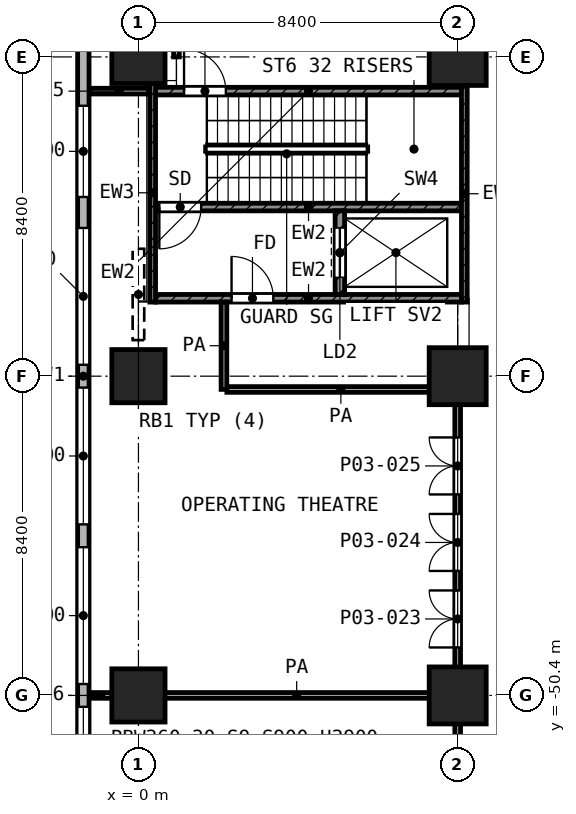
"""IFC4 building model, lengths in metres.
Left out: names, types, materials, properties, quantities, classifications, styles, units other than length and angle.
Written with IfcOpenShell. Run it as: python <this file> out.ifc"""

import sys

from ifc_helpers import new_model, si_unit, direction, frame, frame_2d, origin, origin_2d, place, context, subcontext, project, spatial, rectangle, extrude, element, fill, save


model = new_model("IFC4")
c1 = context("Model", 3, precision=1e-05, world=origin(), true_north=direction((0.0, 1.0)))
c2 = subcontext(c1, "Body", "Model", "MODEL_VIEW")
j1 = project(units=[si_unit("LENGTHUNIT", "METRE"), si_unit("PLANEANGLEUNIT", "RADIAN")], contexts=[c1])
p1 = place(None, origin())
s1 = spatial("IfcSite", under=j1, at=p1, CompositionType="ELEMENT")
p2 = place(p1, origin())
s2 = spatial("IfcBuilding", under=s1, at=p2, CompositionType="ELEMENT")
p3 = place(p2, frame((0.0, 0.0, 12.6)))
s3 = spatial("IfcBuildingStorey", under=s2, at=p3, CompositionType="ELEMENT", Elevation=12.6)
p4 = place(p3, frame((0.0, -33.6, 0.0), z_axis=(0.0, 0.0, 1.0), x_axis=(1.0, 0.0, 0.0)))
e1 = element("IfcColumn", 1, at=p4, inside=s3, PredefinedType="COLUMN", context=c2, shape_type="SweptSolid", body=[
    extrude(rectangle(XDim=1.4, YDim=1.4, at=origin_2d()), origin(), (0.0, 0.0, 1.0), 5.6),
])
p5 = place(p3, frame((8.4, -33.6, 0.0), z_axis=(0.0, 0.0, 1.0), x_axis=(1.0, 0.0, 0.0)))
e2 = element("IfcColumn", 2, at=p5, inside=s3, PredefinedType="COLUMN", context=c2, shape_type="SweptSolid", body=[
    extrude(rectangle(XDim=1.5, YDim=1.5, at=origin_2d()), origin(), (0.0, 0.0, 1.0), 5.6),
])
p6 = place(p3, frame((0.0, -42.0, 0.0), z_axis=(0.0, 0.0, 1.0), x_axis=(1.0, 0.0, 0.0)))
e3 = element("IfcColumn", 3, at=p6, inside=s3, PredefinedType="COLUMN", context=c2, shape_type="SweptSolid", body=[
    extrude(rectangle(XDim=1.4, YDim=1.4, at=origin_2d()), origin(), (0.0, 0.0, 1.0), 5.6),
])
p7 = place(p3, frame((8.4, -42.0, 0.0), z_axis=(0.0, 0.0, 1.0), x_axis=(1.0, 0.0, 0.0)))
e4 = element("IfcColumn", 4, at=p7, inside=s3, PredefinedType="COLUMN", context=c2, shape_type="SweptSolid", body=[
    extrude(rectangle(XDim=1.5, YDim=1.5, at=origin_2d()), origin(), (0.0, 0.0, 1.0), 5.6),
])
p8 = place(p3, frame((0.0, -50.4, 0.0), z_axis=(0.0, 0.0, 1.0), x_axis=(1.0, 0.0, 0.0)))
e5 = element("IfcColumn", 5, at=p8, inside=s3, PredefinedType="COLUMN", context=c2, shape_type="SweptSolid", body=[
    extrude(rectangle(XDim=1.4, YDim=1.4, at=origin_2d()), origin(), (0.0, 0.0, 1.0), 5.6),
])
p9 = place(p3, frame((8.4, -50.4, 0.0), z_axis=(0.0, 0.0, 1.0), x_axis=(1.0, 0.0, 0.0)))
e6 = element("IfcColumn", 6, at=p9, inside=s3, PredefinedType="COLUMN", context=c2, shape_type="SweptSolid", body=[
    extrude(rectangle(XDim=1.5, YDim=1.5, at=origin_2d()), origin(), (0.0, 0.0, 1.0), 5.6),
])
p10 = place(p3, frame((-1.45, -4.462, 0.0), z_axis=(0.0, 0.0, 1.0), x_axis=(0.0, -1.0, 0.0)))
e7 = element("IfcWall", 7, at=p10, inside=s3, PredefinedType="SOLIDWALL", context=c2, shape_type="SweptSolid", body=[
    extrude(rectangle(XDim=75.076, YDim=0.3, at=frame_2d((37.538, 0.0))), origin(), (0.0, 0.0, 1.0), 5.25),
])
p11 = place(p10, frame((0.738, 0.0, 0.9)))
e8 = element("IfcOpeningElement", 8, at=p11, cuts=e7, PredefinedType="OPENING", context=c2, shape_type="SweptSolid", body=[
    extrude(rectangle(XDim=2.4, YDim=3.0, at=frame_2d((1.2, 1.5))), frame((0.0, 0.16, 0.0), z_axis=(0.0, -1.0, 0.0), x_axis=(1.0, 0.0, 0.0)), (0.0, 0.0, 1.0), 0.32),
])
p12 = place(p10, frame((4.238, 0.0, 0.9)))
e9 = element("IfcOpeningElement", 9, at=p12, cuts=e7, PredefinedType="OPENING", context=c2, shape_type="SweptSolid", body=[
    extrude(rectangle(XDim=3.6, YDim=3.0, at=frame_2d((1.8, 1.5))), frame((0.0, 0.16, 0.0), z_axis=(0.0, -1.0, 0.0), x_axis=(1.0, 0.0, 0.0)), (0.0, 0.0, 1.0), 0.32),
])
p13 = place(p10, frame((8.438, 0.0, 0.9)))
e10 = element("IfcOpeningElement", 10, at=p13, cuts=e7, PredefinedType="OPENING", context=c2, shape_type="SweptSolid", body=[
    extrude(rectangle(XDim=3.6, YDim=3.0, at=frame_2d((1.8, 1.5))), frame((0.0, 0.16, 0.0), z_axis=(0.0, -1.0, 0.0), x_axis=(1.0, 0.0, 0.0)), (0.0, 0.0, 1.0), 0.32),
])
p14 = place(p10, frame((12.638, 0.0, 0.9)))
e11 = element("IfcOpeningElement", 11, at=p14, cuts=e7, PredefinedType="OPENING", context=c2, shape_type="SweptSolid", body=[
    extrude(rectangle(XDim=3.6, YDim=3.0, at=frame_2d((1.8, 1.5))), frame((0.0, 0.16, 0.0), z_axis=(0.0, -1.0, 0.0), x_axis=(1.0, 0.0, 0.0)), (0.0, 0.0, 1.0), 0.32),
])
p15 = place(p10, frame((16.838, 0.0, 0.9)))
e12 = element("IfcOpeningElement", 12, at=p15, cuts=e7, PredefinedType="OPENING", context=c2, shape_type="SweptSolid", body=[
    extrude(rectangle(XDim=3.6, YDim=3.0, at=frame_2d((1.8, 1.5))), frame((0.0, 0.16, 0.0), z_axis=(0.0, -1.0, 0.0), x_axis=(1.0, 0.0, 0.0)), (0.0, 0.0, 1.0), 0.32),
])
p16 = place(p10, frame((21.403, 0.0, 0.9)))
e13 = element("IfcOpeningElement", 13, at=p16, cuts=e7, PredefinedType="OPENING", context=c2, shape_type="SweptSolid", body=[
    extrude(rectangle(XDim=2.4, YDim=3.0, at=frame_2d((1.2, 1.5))), frame((0.0, 0.16, 0.0), z_axis=(0.0, -1.0, 0.0), x_axis=(1.0, 0.0, 0.0)), (0.0, 0.0, 1.0), 0.32),
])
p17 = place(p10, frame((25.238, 0.0, 0.9)))
e14 = element("IfcOpeningElement", 14, at=p17, cuts=e7, PredefinedType="OPENING", context=c2, shape_type="SweptSolid", body=[
    extrude(rectangle(XDim=3.6, YDim=3.0, at=frame_2d((1.8, 1.5))), frame((0.0, 0.16, 0.0), z_axis=(0.0, -1.0, 0.0), x_axis=(1.0, 0.0, 0.0)), (0.0, 0.0, 1.0), 0.32),
])
p18 = place(p10, frame((30.423, 0.0, 0.9)))
e15 = element("IfcOpeningElement", 15, at=p18, cuts=e7, PredefinedType="OPENING", context=c2, shape_type="SweptSolid", body=[
    extrude(rectangle(XDim=2.4, YDim=3.0, at=frame_2d((1.2, 1.5))), frame((0.0, 0.16, 0.0), z_axis=(0.0, -1.0, 0.0), x_axis=(1.0, 0.0, 0.0)), (0.0, 0.0, 1.0), 0.32),
])
p19 = place(p10, frame((33.638, 0.0, 0.9)))
e16 = element("IfcOpeningElement", 16, at=p19, cuts=e7, PredefinedType="OPENING", context=c2, shape_type="SweptSolid", body=[
    extrude(rectangle(XDim=3.6, YDim=3.0, at=frame_2d((1.8, 1.5))), frame((0.0, 0.16, 0.0), z_axis=(0.0, -1.0, 0.0), x_axis=(1.0, 0.0, 0.0)), (0.0, 0.0, 1.0), 0.32),
])
p20 = place(p10, frame((37.838, 0.0, 0.9)))
e17 = element("IfcOpeningElement", 17, at=p20, cuts=e7, PredefinedType="OPENING", context=c2, shape_type="SweptSolid", body=[
    extrude(rectangle(XDim=3.6, YDim=3.0, at=frame_2d((1.8, 1.5))), frame((0.0, 0.16, 0.0), z_axis=(0.0, -1.0, 0.0), x_axis=(1.0, 0.0, 0.0)), (0.0, 0.0, 1.0), 0.32),
])
p21 = place(p10, frame((42.038, 0.0, 0.9)))
e18 = element("IfcOpeningElement", 18, at=p21, cuts=e7, PredefinedType="OPENING", context=c2, shape_type="SweptSolid", body=[
    extrude(rectangle(XDim=3.6, YDim=3.0, at=frame_2d((1.8, 1.5))), frame((0.0, 0.16, 0.0), z_axis=(0.0, -1.0, 0.0), x_axis=(1.0, 0.0, 0.0)), (0.0, 0.0, 1.0), 0.32),
])
p22 = place(p10, frame((46.238, 0.0, 0.9)))
e19 = element("IfcOpeningElement", 19, at=p22, cuts=e7, PredefinedType="OPENING", context=c2, shape_type="SweptSolid", body=[
    extrude(rectangle(XDim=3.6, YDim=3.0, at=frame_2d((1.8, 1.5))), frame((0.0, 0.16, 0.0), z_axis=(0.0, -1.0, 0.0), x_axis=(1.0, 0.0, 0.0)), (0.0, 0.0, 1.0), 0.32),
])
p23 = place(p10, frame((50.438, 0.0, 0.9)))
e20 = element("IfcOpeningElement", 20, at=p23, cuts=e7, PredefinedType="OPENING", context=c2, shape_type="SweptSolid", body=[
    extrude(rectangle(XDim=3.6, YDim=3.0, at=frame_2d((1.8, 1.5))), frame((0.0, 0.16, 0.0), z_axis=(0.0, -1.0, 0.0), x_axis=(1.0, 0.0, 0.0)), (0.0, 0.0, 1.0), 0.32),
])
p24 = place(p10, frame((54.638, 0.0, 0.9)))
e21 = element("IfcOpeningElement", 21, at=p24, cuts=e7, PredefinedType="OPENING", context=c2, shape_type="SweptSolid", body=[
    extrude(rectangle(XDim=3.6, YDim=3.0, at=frame_2d((1.8, 1.5))), frame((0.0, 0.16, 0.0), z_axis=(0.0, -1.0, 0.0), x_axis=(1.0, 0.0, 0.0)), (0.0, 0.0, 1.0), 0.32),
])
p25 = place(p10, frame((58.838, 0.0, 0.9)))
e22 = element("IfcOpeningElement", 22, at=p25, cuts=e7, PredefinedType="OPENING", context=c2, shape_type="SweptSolid", body=[
    extrude(rectangle(XDim=3.6, YDim=3.0, at=frame_2d((1.8, 1.5))), frame((0.0, 0.16, 0.0), z_axis=(0.0, -1.0, 0.0), x_axis=(1.0, 0.0, 0.0)), (0.0, 0.0, 1.0), 0.32),
])
p26 = place(p10, frame((63.038, 0.0, 0.9)))
e23 = element("IfcOpeningElement", 23, at=p26, cuts=e7, PredefinedType="OPENING", context=c2, shape_type="SweptSolid", body=[
    extrude(rectangle(XDim=3.6, YDim=3.0, at=frame_2d((1.8, 1.5))), frame((0.0, 0.16, 0.0), z_axis=(0.0, -1.0, 0.0), x_axis=(1.0, 0.0, 0.0)), (0.0, 0.0, 1.0), 0.32),
])
p27 = place(p10, frame((67.603, 0.0, 0.9)))
e24 = element("IfcOpeningElement", 24, at=p27, cuts=e7, PredefinedType="OPENING", context=c2, shape_type="SweptSolid", body=[
    extrude(rectangle(XDim=1.2, YDim=3.0, at=frame_2d((0.6, 1.5))), frame((0.0, 0.16, 0.0), z_axis=(0.0, -1.0, 0.0), x_axis=(1.0, 0.0, 0.0)), (0.0, 0.0, 1.0), 0.32),
])
p28 = place(p10, frame((71.938, 0.0, 0.9)))
e25 = element("IfcOpeningElement", 25, at=p28, cuts=e7, PredefinedType="OPENING", context=c2, shape_type="SweptSolid", body=[
    extrude(rectangle(XDim=2.4, YDim=3.0, at=frame_2d((1.2, 1.5))), frame((0.0, 0.16, 0.0), z_axis=(0.0, -1.0, 0.0), x_axis=(1.0, 0.0, 0.0)), (0.0, 0.0, 1.0), 0.32),
])
p29 = place(p3, frame((0.375, -40.05, 0.0), z_axis=(0.0, 0.0, 1.0), x_axis=(0.0, 1.0, 0.0)))
e26 = element("IfcWall", 26, at=p29, inside=s3, PredefinedType="SHEAR", context=c2, shape_type="SweptSolid", body=[
    extrude(rectangle(XDim=5.75, YDim=0.15, at=frame_2d((2.875, 0.0))), origin(), (0.0, 0.0, 1.0), 5.25),
])
p30 = place(p3, frame((8.575, -40.05, 0.0), z_axis=(0.0, 0.0, 1.0), x_axis=(0.0, 1.0, 0.0)))
e27 = element("IfcWall", 27, at=p30, inside=s3, PredefinedType="SHEAR", context=c2, shape_type="SweptSolid", body=[
    extrude(rectangle(XDim=5.7, YDim=0.15, at=frame_2d((2.85, 0.0))), origin(), (0.0, 0.0, 1.0), 5.25),
])
p31 = place(p3, frame((0.45, -34.5, 0.0), z_axis=(0.0, 0.0, 1.0), x_axis=(1.0, 0.0, 0.0)))
e28 = element("IfcWall", 28, at=p31, inside=s3, PredefinedType="SHEAR", context=c2, shape_type="SweptSolid", body=[
    extrude(rectangle(XDim=8.05, YDim=0.2, at=frame_2d((4.025, 0.0))), origin(), (0.0, 0.0, 1.0), 5.25),
])
p32 = place(p31, frame((0.75, 0.0, 0.0)))
e29 = element("IfcOpeningElement", 29, at=p32, cuts=e28, PredefinedType="OPENING", context=c2, shape_type="SweptSolid", body=[
    extrude(rectangle(XDim=1.1, YDim=2.1, at=frame_2d((0.55, 1.05))), frame((0.0, 0.11, 0.0), z_axis=(0.0, -1.0, 0.0), x_axis=(1.0, 0.0, 0.0)), (0.0, 0.0, 1.0), 0.22),
])
p33 = place(p3, frame((0.45, -37.55, 0.0), z_axis=(0.0, 0.0, 1.0), x_axis=(1.0, 0.0, 0.0)))
e30 = element("IfcWall", 30, at=p33, inside=s3, PredefinedType="SHEAR", context=c2, shape_type="SweptSolid", body=[
    extrude(rectangle(XDim=8.05, YDim=0.2, at=frame_2d((4.025, 0.0))), origin(), (0.0, 0.0, 1.0), 5.25),
])
p34 = place(p33, frame((0.1, 0.0, 0.0)))
e31 = element("IfcOpeningElement", 31, at=p34, cuts=e30, PredefinedType="OPENING", context=c2, shape_type="SweptSolid", body=[
    extrude(rectangle(XDim=1.1, YDim=2.1, at=frame_2d((0.55, 1.05))), frame((0.0, 0.11, 0.0), z_axis=(0.0, -1.0, 0.0), x_axis=(1.0, 0.0, 0.0)), (0.0, 0.0, 1.0), 0.22),
])
p35 = place(p3, frame((0.45, -39.95, 0.0), z_axis=(0.0, 0.0, 1.0), x_axis=(1.0, 0.0, 0.0)))
e32 = element("IfcWall", 32, at=p35, inside=s3, PredefinedType="SHEAR", context=c2, shape_type="SweptSolid", body=[
    extrude(rectangle(XDim=8.05, YDim=0.2, at=frame_2d((4.025, 0.0))), origin(), (0.0, 0.0, 1.0), 5.25),
])
p36 = place(p35, frame((2.0, 0.0, 0.0)))
e33 = element("IfcOpeningElement", 33, at=p36, cuts=e32, PredefinedType="OPENING", context=c2, shape_type="SweptSolid", body=[
    extrude(rectangle(XDim=1.1, YDim=2.1, at=frame_2d((0.55, 1.05))), frame((0.0, 0.11, 0.0), z_axis=(0.0, -1.0, 0.0), x_axis=(1.0, 0.0, 0.0)), (0.0, 0.0, 1.0), 0.22),
])
p37 = place(p3, frame((5.3, -39.85, 0.0), z_axis=(0.0, 0.0, 1.0), x_axis=(0.0, 1.0, 0.0)))
e34 = element("IfcWall", 34, at=p37, inside=s3, PredefinedType="SHEAR", context=c2, shape_type="SweptSolid", body=[
    extrude(rectangle(XDim=2.2, YDim=0.25, at=frame_2d((1.1, 0.0))), origin(), (0.0, 0.0, 1.0), 5.25),
])
p38 = place(p37, frame((0.45, 0.0, 0.0)))
e35 = element("IfcOpeningElement", 35, at=p38, cuts=e34, PredefinedType="OPENING", context=c2, shape_type="SweptSolid", body=[
    extrude(rectangle(XDim=1.3, YDim=2.1, at=frame_2d((0.65, 1.05))), frame((0.0, 0.135, 0.0), z_axis=(0.0, -1.0, 0.0), x_axis=(1.0, 0.0, 0.0)), (0.0, 0.0, 1.0), 0.27),
])
p39 = place(p3, frame((-1.28, -50.4, 0.0), z_axis=(0.0, 0.0, 1.0), x_axis=(1.0, 0.0, 0.0)))
e36 = element("IfcWall", 36, at=p39, inside=s3, PredefinedType="PARTITIONING", context=c2, shape_type="SweptSolid", body=[
    extrude(rectangle(XDim=0.58, YDim=0.15, at=frame_2d((0.29, 0.0))), origin(), (0.0, 0.0, 1.0), 4.35),
])
p40 = place(p3, frame((0.002, -50.4, 0.0), z_axis=(0.0, 0.0, 1.0), x_axis=(1.0, 0.0, 0.0)))
e37 = element("IfcWall", 37, at=p40, inside=s3, PredefinedType="PARTITIONING", context=c2, shape_type="SweptSolid", body=[
    extrude(rectangle(XDim=8.323, YDim=0.15, at=frame_2d((4.162, 0.0))), origin(), (0.0, 0.0, 1.0), 5.25),
])
p41 = place(p3, frame((2.327, -42.35, 0.0), z_axis=(0.0, 0.0, 1.0), x_axis=(1.0, 0.0, 0.0)))
e38 = element("IfcWall", 38, at=p41, inside=s3, PredefinedType="PARTITIONING", context=c2, shape_type="SweptSolid", body=[
    extrude(rectangle(XDim=5.998, YDim=0.15, at=frame_2d((2.999, 0.0))), origin(), (0.0, 0.0, 1.0), 5.25),
])
p42 = place(p3, frame((-1.28, -34.5, 0.0), z_axis=(0.0, 0.0, 1.0), x_axis=(1.0, 0.0, 0.0)))
e39 = element("IfcWall", 39, at=p42, inside=s3, PredefinedType="PARTITIONING", context=c2, shape_type="SweptSolid", body=[
    extrude(rectangle(XDim=1.55, YDim=0.15, at=frame_2d((0.775, 0.0))), origin(), (0.0, 0.0, 1.0), 3.85),
])
p43 = place(p3, frame((1.0, -33.6, 0.0), z_axis=(0.0, 0.0, 1.0), x_axis=(0.0, 1.0, 0.0)))
e40 = element("IfcWall", 40, at=p43, inside=s3, PredefinedType="PARTITIONING", context=c2, shape_type="SweptSolid", body=[
    extrude(rectangle(XDim=1.991, YDim=0.15, at=frame_2d((0.996, 0.0))), origin(), (0.0, 0.0, 1.0), 5.25),
])
p44 = place(p3, frame((2.25, -42.348, 0.0), z_axis=(0.0, 0.0, 1.0), x_axis=(0.0, 1.0, 0.0)))
e41 = element("IfcWall", 41, at=p44, inside=s3, PredefinedType="PARTITIONING", context=c2, shape_type="SweptSolid", body=[
    extrude(rectangle(XDim=2.298, YDim=0.15, at=frame_2d((1.149, 0.0))), origin(), (0.0, 0.0, 1.0), 5.25),
])
p45 = place(p3, frame((8.4, -67.947, 0.0), z_axis=(0.0, 0.0, 1.0), x_axis=(0.0, 1.0, 0.0)))
e42 = element("IfcWall", 42, at=p45, inside=s3, PredefinedType="PARTITIONING", context=c2, shape_type="SweptSolid", body=[
    extrude(rectangle(XDim=25.597, YDim=0.15, at=frame_2d((12.798, 0.0))), origin(), (0.0, 0.0, 1.0), 5.25),
])
p46 = place(p45, frame((18.809, 0.0, 0.0)))
e43 = element("IfcOpeningElement", 43, at=p46, cuts=e42, PredefinedType="OPENING", context=c2, shape_type="SweptSolid", body=[
    extrude(rectangle(XDim=1.5, YDim=2.1, at=frame_2d((0.75, 1.05))), frame((0.0, 0.085, 0.0), z_axis=(0.0, -1.0, 0.0), x_axis=(1.0, 0.0, 0.0)), (0.0, 0.0, 1.0), 0.17),
])
p47 = place(p45, frame((20.822, 0.0, 0.0)))
e44 = element("IfcOpeningElement", 44, at=p47, cuts=e42, PredefinedType="OPENING", context=c2, shape_type="SweptSolid", body=[
    extrude(rectangle(XDim=1.5, YDim=2.1, at=frame_2d((0.75, 1.05))), frame((0.0, 0.085, 0.0), z_axis=(0.0, -1.0, 0.0), x_axis=(1.0, 0.0, 0.0)), (0.0, 0.0, 1.0), 0.17),
])
p48 = place(p45, frame((22.835, 0.0, 0.0)))
e45 = element("IfcOpeningElement", 45, at=p48, cuts=e42, PredefinedType="OPENING", context=c2, shape_type="SweptSolid", body=[
    extrude(rectangle(XDim=1.5, YDim=2.1, at=frame_2d((0.75, 1.05))), frame((0.0, 0.085, 0.0), z_axis=(0.0, -1.0, 0.0), x_axis=(1.0, 0.0, 0.0)), (0.0, 0.0, 1.0), 0.17),
])
p49 = place(p45, frame((10.497, 0.0, 0.0)))
e46 = element("IfcOpeningElement", 46, at=p49, cuts=e42, PredefinedType="OPENING", context=c2, shape_type="SweptSolid", body=[
    extrude(rectangle(XDim=1.5, YDim=2.1, at=frame_2d((0.75, 1.05))), frame((0.0, 0.085, 0.0), z_axis=(0.0, -1.0, 0.0), x_axis=(1.0, 0.0, 0.0)), (0.0, 0.0, 1.0), 0.17),
])
p50 = place(p45, frame((12.597, 0.0, 0.0)))
e47 = element("IfcOpeningElement", 47, at=p50, cuts=e42, PredefinedType="OPENING", context=c2, shape_type="SweptSolid", body=[
    extrude(rectangle(XDim=1.5, YDim=2.1, at=frame_2d((0.75, 1.05))), frame((0.0, 0.085, 0.0), z_axis=(0.0, -1.0, 0.0), x_axis=(1.0, 0.0, 0.0)), (0.0, 0.0, 1.0), 0.17),
])
p51 = place(p45, frame((14.697, 0.0, 0.0)))
e48 = element("IfcOpeningElement", 48, at=p51, cuts=e42, PredefinedType="OPENING", context=c2, shape_type="SweptSolid", body=[
    extrude(rectangle(XDim=1.5, YDim=2.1, at=frame_2d((0.75, 1.05))), frame((0.0, 0.085, 0.0), z_axis=(0.0, -1.0, 0.0), x_axis=(1.0, 0.0, 0.0)), (0.0, 0.0, 1.0), 0.17),
])
p52 = place(p45, frame((1.537, 0.0, 0.0)))
e49 = element("IfcOpeningElement", 49, at=p52, cuts=e42, PredefinedType="OPENING", context=c2, shape_type="SweptSolid", body=[
    extrude(rectangle(XDim=1.5, YDim=2.1, at=frame_2d((0.75, 1.05))), frame((0.0, 0.085, 0.0), z_axis=(0.0, -1.0, 0.0), x_axis=(1.0, 0.0, 0.0)), (0.0, 0.0, 1.0), 0.17),
])
p53 = place(p45, frame((3.823, 0.0, 0.0)))
e50 = element("IfcOpeningElement", 50, at=p53, cuts=e42, PredefinedType="OPENING", context=c2, shape_type="SweptSolid", body=[
    extrude(rectangle(XDim=1.5, YDim=2.1, at=frame_2d((0.75, 1.05))), frame((0.0, 0.085, 0.0), z_axis=(0.0, -1.0, 0.0), x_axis=(1.0, 0.0, 0.0)), (0.0, 0.0, 1.0), 0.17),
])
p54 = place(p45, frame((6.11, 0.0, 0.0)))
e51 = element("IfcOpeningElement", 51, at=p54, cuts=e42, PredefinedType="OPENING", context=c2, shape_type="SweptSolid", body=[
    extrude(rectangle(XDim=1.5, YDim=2.1, at=frame_2d((0.75, 1.05))), frame((0.0, 0.085, 0.0), z_axis=(0.0, -1.0, 0.0), x_axis=(1.0, 0.0, 0.0)), (0.0, 0.0, 1.0), 0.17),
])
p55 = place(p18, origin())
e52 = element("IfcWindow", 52, at=p55, inside=s3, PartitioningType="SINGLE_PANEL", PredefinedType="WINDOW", context=c2, shape_type="SweptSolid", body=[
    extrude(rectangle(XDim=2.4, YDim=3.0, at=frame_2d((1.2, 1.5))), frame((0.0, 0.03, 0.0), z_axis=(0.0, -1.0, 0.0), x_axis=(1.0, 0.0, 0.0)), (0.0, 0.0, 1.0), 0.06),
])
fill(e15, e52)
p56 = place(p19, origin())
e53 = element("IfcWindow", 53, at=p56, inside=s3, PartitioningType="SINGLE_PANEL", PredefinedType="WINDOW", context=c2, shape_type="SweptSolid", body=[
    extrude(rectangle(XDim=3.6, YDim=3.0, at=frame_2d((1.8, 1.5))), frame((0.0, 0.03, 0.0), z_axis=(0.0, -1.0, 0.0), x_axis=(1.0, 0.0, 0.0)), (0.0, 0.0, 1.0), 0.06),
])
fill(e16, e53)
p57 = place(p20, origin())
e54 = element("IfcWindow", 54, at=p57, inside=s3, PartitioningType="SINGLE_PANEL", PredefinedType="WINDOW", context=c2, shape_type="SweptSolid", body=[
    extrude(rectangle(XDim=3.6, YDim=3.0, at=frame_2d((1.8, 1.5))), frame((0.0, 0.03, 0.0), z_axis=(0.0, -1.0, 0.0), x_axis=(1.0, 0.0, 0.0)), (0.0, 0.0, 1.0), 0.06),
])
fill(e17, e54)
p58 = place(p21, origin())
e55 = element("IfcWindow", 55, at=p58, inside=s3, PartitioningType="SINGLE_PANEL", PredefinedType="WINDOW", context=c2, shape_type="SweptSolid", body=[
    extrude(rectangle(XDim=3.6, YDim=3.0, at=frame_2d((1.8, 1.5))), frame((0.0, 0.03, 0.0), z_axis=(0.0, -1.0, 0.0), x_axis=(1.0, 0.0, 0.0)), (0.0, 0.0, 1.0), 0.06),
])
fill(e18, e55)
p59 = place(p22, origin())
e56 = element("IfcWindow", 56, at=p59, inside=s3, PartitioningType="SINGLE_PANEL", PredefinedType="WINDOW", context=c2, shape_type="SweptSolid", body=[
    extrude(rectangle(XDim=3.6, YDim=3.0, at=frame_2d((1.8, 1.5))), frame((0.0, 0.03, 0.0), z_axis=(0.0, -1.0, 0.0), x_axis=(1.0, 0.0, 0.0)), (0.0, 0.0, 1.0), 0.06),
])
fill(e19, e56)
p60 = place(p32, origin())
e57 = element("IfcDoor", 57, at=p60, inside=s3, OperationType="SINGLE_SWING_LEFT", PredefinedType="DOOR", context=c2, shape_type="SweptSolid", body=[
    extrude(rectangle(XDim=1.1, YDim=2.1, at=frame_2d((0.55, 1.05))), frame((0.0, 0.025, 0.0), z_axis=(0.0, -1.0, 0.0), x_axis=(1.0, 0.0, 0.0)), (0.0, 0.0, 1.0), 0.05),
])
fill(e29, e57)
p61 = place(p34, frame((1.1, 0.0, 0.0), z_axis=(0.0, 0.0, 1.0), x_axis=(-1.0, 0.0, 0.0)))
e58 = element("IfcDoor", 58, at=p61, inside=s3, OperationType="SINGLE_SWING_LEFT", PredefinedType="DOOR", context=c2, shape_type="SweptSolid", body=[
    extrude(rectangle(XDim=1.1, YDim=2.1, at=frame_2d((0.55, 1.05))), frame((0.0, 0.025, 0.0), z_axis=(0.0, -1.0, 0.0), x_axis=(1.0, 0.0, 0.0)), (0.0, 0.0, 1.0), 0.05),
])
fill(e31, e58)
p62 = place(p38, origin())
e59 = element("IfcDoor", 59, at=p62, inside=s3, OperationType="DOUBLE_DOOR_SLIDING", PredefinedType="DOOR", context=c2, shape_type="SweptSolid", body=[
    extrude(rectangle(XDim=1.3, YDim=2.1, at=frame_2d((0.65, 1.05))), frame((0.0, 0.025, 0.0), z_axis=(0.0, -1.0, 0.0), x_axis=(1.0, 0.0, 0.0)), (0.0, 0.0, 1.0), 0.05),
])
fill(e35, e59)
p63 = place(p36, origin())
e60 = element("IfcDoor", 60, at=p63, inside=s3, OperationType="SINGLE_SWING_LEFT", PredefinedType="DOOR", context=c2, shape_type="SweptSolid", body=[
    extrude(rectangle(XDim=1.1, YDim=2.1, at=frame_2d((0.55, 1.05))), frame((0.0, 0.025, 0.0), z_axis=(0.0, -1.0, 0.0), x_axis=(1.0, 0.0, 0.0)), (0.0, 0.0, 1.0), 0.05),
])
fill(e33, e60)
p64 = place(p46, origin())
e61 = element("IfcDoor", 61, at=p64, inside=s3, OperationType="DOUBLE_DOOR_SINGLE_SWING", PredefinedType="DOOR", context=c2, shape_type="SweptSolid", body=[
    extrude(rectangle(XDim=1.5, YDim=2.1, at=frame_2d((0.75, 1.05))), frame((0.0, 0.025, 0.0), z_axis=(0.0, -1.0, 0.0), x_axis=(1.0, 0.0, 0.0)), (0.0, 0.0, 1.0), 0.05),
])
fill(e43, e61)
p65 = place(p47, origin())
e62 = element("IfcDoor", 62, at=p65, inside=s3, OperationType="DOUBLE_DOOR_SINGLE_SWING", PredefinedType="DOOR", context=c2, shape_type="SweptSolid", body=[
    extrude(rectangle(XDim=1.5, YDim=2.1, at=frame_2d((0.75, 1.05))), frame((0.0, 0.025, 0.0), z_axis=(0.0, -1.0, 0.0), x_axis=(1.0, 0.0, 0.0)), (0.0, 0.0, 1.0), 0.05),
])
fill(e44, e62)
p66 = place(p48, origin())
e63 = element("IfcDoor", 63, at=p66, inside=s3, OperationType="DOUBLE_DOOR_SINGLE_SWING", PredefinedType="DOOR", context=c2, shape_type="SweptSolid", body=[
    extrude(rectangle(XDim=1.5, YDim=2.1, at=frame_2d((0.75, 1.05))), frame((0.0, 0.025, 0.0), z_axis=(0.0, -1.0, 0.0), x_axis=(1.0, 0.0, 0.0)), (0.0, 0.0, 1.0), 0.05),
])
fill(e45, e63)
save(model, sys.argv[1])
